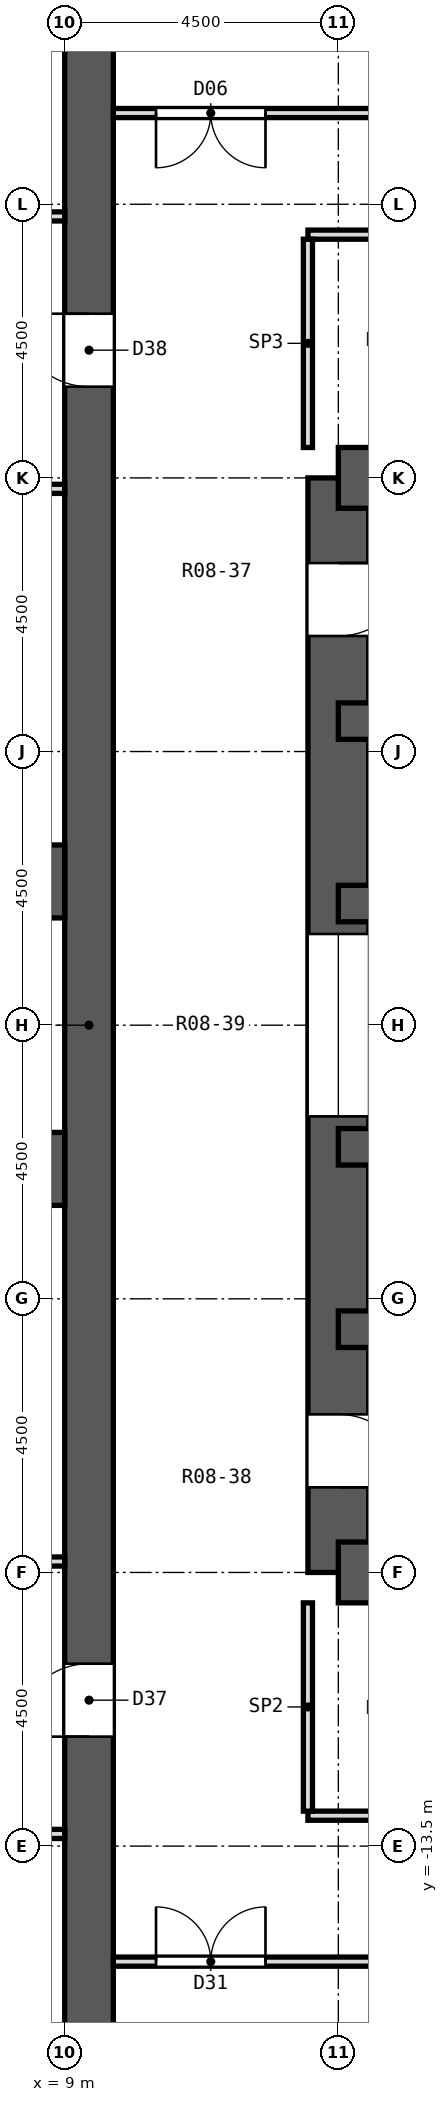
"""IFC4 building model, lengths in metres.
Left out: names, types, materials, properties, quantities, classifications, styles, units other than length and angle.
Written with IfcOpenShell. Run it as: python <this file> out.ifc"""

import sys

from ifc_helpers import new_model, si_unit, direction, frame, frame_2d, origin, place, context, subcontext, project, spatial, rectangle, extrude, element, fill, save


model = new_model("IFC4")
c1 = context("Model", 3, precision=1e-05, world=origin(), true_north=direction((0.0, 1.0)))
c2 = subcontext(c1, "Body", "Model", "MODEL_VIEW")
j1 = project(units=[si_unit("LENGTHUNIT", "METRE"), si_unit("PLANEANGLEUNIT", "RADIAN")], contexts=[c1])
p1 = place(None, origin())
s1 = spatial("IfcSite", under=j1, at=p1, CompositionType="ELEMENT")
p2 = place(p1, origin())
s2 = spatial("IfcBuilding", under=s1, at=p2, CompositionType="ELEMENT")
p3 = place(p2, frame((0.0, 0.0, 21.8)))
s3 = spatial("IfcBuildingStorey", under=s2, at=p3, CompositionType="ELEMENT", Elevation=21.8)
p4 = place(p3, frame((13.5, -9.0, 0.0), z_axis=(0.0, 0.0, 1.0), x_axis=(0.0, 1.0, 0.0)))
e1 = element("IfcWall", 1, at=p4, inside=s3, PredefinedType="SHEAR", context=c2, shape_type="SweptSolid", body=[
    extrude(rectangle(XDim=18.0, YDim=1.0, at=frame_2d((9.0, 0.0))), origin(), (0.0, 0.0, 1.0), 4.5),
])
p5 = place(p4, frame((15.4, 0.0, 0.0)))
e2 = element("IfcOpeningElement", 2, at=p5, cuts=e1, PredefinedType="OPENING", context=c2, shape_type="SweptSolid", body=[
    extrude(rectangle(XDim=1.2, YDim=2.1, at=frame_2d((0.6, 1.05))), frame((0.0, 0.512, 0.0), z_axis=(0.0, -1.0, 0.0), x_axis=(1.0, 0.0, 0.0)), (0.0, 0.0, 1.0), 1.024),
])
p6 = place(p4, frame((1.4, 0.0, 0.0)))
e3 = element("IfcOpeningElement", 3, at=p6, cuts=e1, PredefinedType="OPENING", context=c2, shape_type="SweptSolid", body=[
    extrude(rectangle(XDim=1.2, YDim=2.1, at=frame_2d((0.6, 1.05))), frame((0.0, 0.512, 0.0), z_axis=(0.0, -1.0, 0.0), x_axis=(1.0, 0.0, 0.0)), (0.0, 0.0, 1.0), 1.024),
])
p7 = place(p4, frame((7.5, 0.0, 0.0)))
e4 = element("IfcOpeningElement", 4, at=p7, cuts=e1, PredefinedType="OPENING", context=c2, shape_type="SweptSolid", body=[
    extrude(rectangle(XDim=3.0, YDim=2.4, at=frame_2d((1.5, 1.2))), frame((0.0, 0.512, 0.0), z_axis=(0.0, -1.0, 0.0), x_axis=(1.0, 0.0, 0.0)), (0.0, 0.0, 1.0), 1.024),
])
for number, where, z_axis, x_axis in (
    (5, (13.5, 9.0, 0.0), (0.0, 0.0, 1.0), (1.0, 0.0, 0.0)),
    (6, (13.5, -9.0, 0.0), (0.0, 0.0, 1.0), (1.0, 0.0, 0.0)),
):
    element("IfcWall", number, at=place(p3, frame(where, z_axis=z_axis, x_axis=x_axis)), inside=s3, PredefinedType="SHEAR", context=c2, shape_type="SweptSolid", body=[
        extrude(rectangle(XDim=12.4, YDim=1.0, at=frame_2d((6.2, 0.0))), origin(), (0.0, 0.0, 1.0), 4.5),
    ])
p8 = place(p3, frame((13.5, 5.0, 0.0), z_axis=(0.0, 0.0, 1.0), x_axis=(1.0, 0.0, 0.0)))
e7 = element("IfcWall", 7, at=p8, inside=s3, PredefinedType="SHEAR", context=c2, shape_type="SweptSolid", body=[
    extrude(rectangle(XDim=12.4, YDim=0.6, at=frame_2d((6.2, 0.0))), origin(), (0.0, 0.0, 1.0), 4.5),
])
p9 = place(p8, frame((10.35, 0.0, 0.0)))
e8 = element("IfcOpeningElement", 8, at=p9, cuts=e7, PredefinedType="OPENING", context=c2, shape_type="SweptSolid", body=[
    extrude(rectangle(XDim=0.9, YDim=2.1, at=frame_2d((0.45, 1.05))), frame((0.0, 0.312, 0.0), z_axis=(0.0, -1.0, 0.0), x_axis=(1.0, 0.0, 0.0)), (0.0, 0.0, 1.0), 0.624),
])
p10 = place(p3, frame((13.5, -5.0, 0.0), z_axis=(0.0, 0.0, 1.0), x_axis=(1.0, 0.0, 0.0)))
e9 = element("IfcWall", 9, at=p10, inside=s3, PredefinedType="SHEAR", context=c2, shape_type="SweptSolid", body=[
    extrude(rectangle(XDim=12.4, YDim=0.6, at=frame_2d((6.2, 0.0))), origin(), (0.0, 0.0, 1.0), 4.5),
])
p11 = place(p10, frame((10.31, 0.0, 0.0)))
e10 = element("IfcOpeningElement", 10, at=p11, cuts=e9, PredefinedType="OPENING", context=c2, shape_type="SweptSolid", body=[
    extrude(rectangle(XDim=0.9, YDim=2.1, at=frame_2d((0.45, 1.05))), frame((0.0, 0.312, 0.0), z_axis=(0.0, -1.0, 0.0), x_axis=(1.0, 0.0, 0.0)), (0.0, 0.0, 1.0), 0.624),
])
p12 = place(p10, frame((0.6, 0.0, 0.0)))
e11 = element("IfcOpeningElement", 11, at=p12, cuts=e9, PredefinedType="OPENING", context=c2, shape_type="SweptSolid", body=[
    extrude(rectangle(XDim=1.1, YDim=2.1, at=frame_2d((0.55, 1.05))), frame((0.0, 0.312, 0.0), z_axis=(0.0, -1.0, 0.0), x_axis=(1.0, 0.0, 0.0)), (0.0, 0.0, 1.0), 0.624),
])
p13 = place(p3, frame((13.5, 2.0, 0.0), z_axis=(0.0, 0.0, 1.0), x_axis=(1.0, 0.0, 0.0)))
e12 = element("IfcWall", 12, at=p13, inside=s3, PredefinedType="SHEAR", context=c2, shape_type="SweptSolid", body=[
    extrude(rectangle(XDim=12.4, YDim=0.6, at=frame_2d((6.2, 0.0))), origin(), (0.0, 0.0, 1.0), 4.5),
])
p14 = place(p13, frame((7.65, 0.0, 0.0)))
e13 = element("IfcOpeningElement", 13, at=p14, cuts=e12, PredefinedType="OPENING", context=c2, shape_type="SweptSolid", body=[
    extrude(rectangle(XDim=1.1, YDim=2.1, at=frame_2d((0.55, 1.05))), frame((0.0, 0.312, 0.0), z_axis=(0.0, -1.0, 0.0), x_axis=(1.0, 0.0, 0.0)), (0.0, 0.0, 1.0), 0.624),
])
p15 = place(p13, frame((1.076, 0.0, 0.0)))
e14 = element("IfcOpeningElement", 14, at=p15, cuts=e12, PredefinedType="OPENING", context=c2, shape_type="SweptSolid", body=[
    extrude(rectangle(XDim=0.9, YDim=2.1, at=frame_2d((0.45, 1.05))), frame((0.0, 0.312, 0.0), z_axis=(0.0, -1.0, 0.0), x_axis=(1.0, 0.0, 0.0)), (0.0, 0.0, 1.0), 0.624),
])
p16 = place(p13, frame((3.196, 0.0, 0.0)))
e15 = element("IfcOpeningElement", 15, at=p16, cuts=e12, PredefinedType="OPENING", context=c2, shape_type="SweptSolid", body=[
    extrude(rectangle(XDim=0.9, YDim=2.1, at=frame_2d((0.45, 1.05))), frame((0.0, 0.312, 0.0), z_axis=(0.0, -1.0, 0.0), x_axis=(1.0, 0.0, 0.0)), (0.0, 0.0, 1.0), 0.624),
])
p17 = place(p13, frame((5.59, 0.0, 0.0)))
e16 = element("IfcOpeningElement", 16, at=p17, cuts=e12, PredefinedType="OPENING", context=c2, shape_type="SweptSolid", body=[
    extrude(rectangle(XDim=0.9, YDim=2.1, at=frame_2d((0.45, 1.05))), frame((0.0, 0.312, 0.0), z_axis=(0.0, -1.0, 0.0), x_axis=(1.0, 0.0, 0.0)), (0.0, 0.0, 1.0), 0.624),
])
p18 = place(p13, frame((10.31, 0.0, 0.0)))
e17 = element("IfcOpeningElement", 17, at=p18, cuts=e12, PredefinedType="OPENING", context=c2, shape_type="SweptSolid", body=[
    extrude(rectangle(XDim=0.9, YDim=2.1, at=frame_2d((0.45, 1.05))), frame((0.0, 0.312, 0.0), z_axis=(0.0, -1.0, 0.0), x_axis=(1.0, 0.0, 0.0)), (0.0, 0.0, 1.0), 0.624),
])
p19 = place(p3, frame((13.5, -2.0, 0.0), z_axis=(0.0, 0.0, 1.0), x_axis=(1.0, 0.0, 0.0)))
e18 = element("IfcWall", 18, at=p19, inside=s3, PredefinedType="SHEAR", context=c2, shape_type="SweptSolid", body=[
    extrude(rectangle(XDim=12.4, YDim=0.6, at=frame_2d((6.2, 0.0))), origin(), (0.0, 0.0, 1.0), 4.5),
])
p20 = place(p19, frame((5.62, 0.0, 0.0)))
e19 = element("IfcOpeningElement", 19, at=p20, cuts=e18, PredefinedType="OPENING", context=c2, shape_type="SweptSolid", body=[
    extrude(rectangle(XDim=1.1, YDim=2.1, at=frame_2d((0.55, 1.05))), frame((0.0, 0.312, 0.0), z_axis=(0.0, -1.0, 0.0), x_axis=(1.0, 0.0, 0.0)), (0.0, 0.0, 1.0), 0.624),
])
p21 = place(p19, frame((7.65, 0.0, 0.0)))
e20 = element("IfcOpeningElement", 20, at=p21, cuts=e18, PredefinedType="OPENING", context=c2, shape_type="SweptSolid", body=[
    extrude(rectangle(XDim=1.1, YDim=2.1, at=frame_2d((0.55, 1.05))), frame((0.0, 0.312, 0.0), z_axis=(0.0, -1.0, 0.0), x_axis=(1.0, 0.0, 0.0)), (0.0, 0.0, 1.0), 0.624),
])
p22 = place(p19, frame((1.265, 0.0, 0.0)))
e21 = element("IfcOpeningElement", 21, at=p22, cuts=e18, PredefinedType="OPENING", context=c2, shape_type="SweptSolid", body=[
    extrude(rectangle(XDim=1.0, YDim=2.1, at=frame_2d((0.5, 1.05))), frame((0.0, 0.312, 0.0), z_axis=(0.0, -1.0, 0.0), x_axis=(1.0, 0.0, 0.0)), (0.0, 0.0, 1.0), 0.624),
])
p23 = place(p19, frame((10.31, 0.0, 0.0)))
e22 = element("IfcOpeningElement", 22, at=p23, cuts=e18, PredefinedType="OPENING", context=c2, shape_type="SweptSolid", body=[
    extrude(rectangle(XDim=0.9, YDim=2.1, at=frame_2d((0.45, 1.05))), frame((0.0, 0.312, 0.0), z_axis=(0.0, -1.0, 0.0), x_axis=(1.0, 0.0, 0.0)), (0.0, 0.0, 1.0), 0.624),
])
p24 = place(p3, frame((9.4, -27.077, 0.0), z_axis=(0.0, 0.0, 1.0), x_axis=(0.0, 1.0, 0.0)))
e23 = element("IfcWall", 23, at=p24, inside=s3, PredefinedType="SHEAR", context=c2, shape_type="SweptSolid", body=[
    extrude(rectangle(XDim=54.154, YDim=0.8, at=frame_2d((27.077, 0.0))), origin(), (0.0, 0.0, 1.0), 4.5),
])
p25 = place(p24, frame((15.377, 0.0, 0.0)))
e24 = element("IfcOpeningElement", 24, at=p25, cuts=e23, PredefinedType="OPENING", context=c2, shape_type="SweptSolid", body=[
    extrude(rectangle(XDim=1.2, YDim=2.1, at=frame_2d((0.6, 1.05))), frame((0.0, 0.412, 0.0), z_axis=(0.0, -1.0, 0.0), x_axis=(1.0, 0.0, 0.0)), (0.0, 0.0, 1.0), 0.824),
])
p26 = place(p24, frame((37.577, 0.0, 0.0)))
e25 = element("IfcOpeningElement", 25, at=p26, cuts=e23, PredefinedType="OPENING", context=c2, shape_type="SweptSolid", body=[
    extrude(rectangle(XDim=1.2, YDim=2.1, at=frame_2d((0.6, 1.05))), frame((0.0, 0.412, 0.0), z_axis=(0.0, -1.0, 0.0), x_axis=(1.0, 0.0, 0.0)), (0.0, 0.0, 1.0), 0.824),
])
for number, where, z_axis, x_axis in (
    (26, (8.68, 1.764, 0.0), (0.0, 0.0, 1.0), (0.0, 1.0, 0.0)),
    (27, (8.68, -2.964, 0.0), (0.0, 0.0, 1.0), (0.0, 1.0, 0.0)),
):
    element("IfcWall", number, at=place(p3, frame(where, z_axis=z_axis, x_axis=x_axis)), inside=s3, PredefinedType="SHEAR", context=c2, shape_type="SweptSolid", body=[
        extrude(rectangle(XDim=1.2, YDim=0.64, at=frame_2d((0.6, 0.0))), origin(), (0.0, 0.0, 1.0), 3.95),
    ])
p27 = place(p3, frame((9.8, -15.4, 0.0), z_axis=(0.0, 0.0, 1.0), x_axis=(1.0, 0.0, 0.0)))
e28 = element("IfcWall", 28, at=p27, inside=s3, PredefinedType="PARTITIONING", context=c2, shape_type="SweptSolid", body=[
    extrude(rectangle(XDim=13.975, YDim=0.15, at=frame_2d((6.987, 0.0))), origin(), (0.0, 0.0, 1.0), 3.95),
])
p28 = place(p27, frame((0.702, 0.0, 0.0)))
e29 = element("IfcOpeningElement", 29, at=p28, cuts=e28, PredefinedType="OPENING", context=c2, shape_type="SweptSolid", body=[
    extrude(rectangle(XDim=1.8, YDim=2.1, at=frame_2d((0.9, 1.05))), frame((0.0, 0.087, 0.0), z_axis=(0.0, -1.0, 0.0), x_axis=(1.0, 0.0, 0.0)), (0.0, 0.0, 1.0), 0.174),
])
p29 = place(p27, frame((8.396, 0.0, 0.0)))
e30 = element("IfcOpeningElement", 30, at=p29, cuts=e28, PredefinedType="OPENING", context=c2, shape_type="SweptSolid", body=[
    extrude(rectangle(XDim=1.0, YDim=2.1, at=frame_2d((0.5, 1.05))), frame((0.0, 0.087, 0.0), z_axis=(0.0, -1.0, 0.0), x_axis=(1.0, 0.0, 0.0)), (0.0, 0.0, 1.0), 0.174),
])
p30 = place(p3, frame((2.1, -13.3, 0.0), z_axis=(0.0, 0.0, 1.0), x_axis=(1.0, 0.0, 0.0)))
e31 = element("IfcWall", 31, at=p30, inside=s3, PredefinedType="PARTITIONING", context=c2, shape_type="SweptSolid", body=[
    extrude(rectangle(XDim=6.9, YDim=0.15, at=frame_2d((3.45, 0.0))), origin(), (0.0, 0.0, 1.0), 3.95),
])
p31 = place(p3, frame((13.0, -13.0, 0.0), z_axis=(0.0, 0.0, 1.0), x_axis=(1.0, 0.0, 0.0)))
e32 = element("IfcWall", 32, at=p31, inside=s3, PredefinedType="PARTITIONING", context=c2, shape_type="SweptSolid", body=[
    extrude(rectangle(XDim=12.16, YDim=0.15, at=frame_2d((6.08, 0.0))), origin(), (0.0, 0.0, 1.0), 3.95),
])
p32 = place(p31, frame((1.075, 0.0, 0.0)))
e33 = element("IfcOpeningElement", 33, at=p32, cuts=e32, PredefinedType="OPENING", context=c2, shape_type="SweptSolid", body=[
    extrude(rectangle(XDim=0.9, YDim=2.1, at=frame_2d((0.45, 1.05))), frame((0.0, 0.087, 0.0), z_axis=(0.0, -1.0, 0.0), x_axis=(1.0, 0.0, 0.0)), (0.0, 0.0, 1.0), 0.174),
])
p33 = place(p31, frame((4.125, 0.0, 0.0)))
e34 = element("IfcOpeningElement", 34, at=p33, cuts=e32, PredefinedType="OPENING", context=c2, shape_type="SweptSolid", body=[
    extrude(rectangle(XDim=0.9, YDim=2.1, at=frame_2d((0.45, 1.05))), frame((0.0, 0.087, 0.0), z_axis=(0.0, -1.0, 0.0), x_axis=(1.0, 0.0, 0.0)), (0.0, 0.0, 1.0), 0.174),
])
p34 = place(p31, frame((7.175, 0.0, 0.0)))
e35 = element("IfcOpeningElement", 35, at=p34, cuts=e32, PredefinedType="OPENING", context=c2, shape_type="SweptSolid", body=[
    extrude(rectangle(XDim=0.9, YDim=2.1, at=frame_2d((0.45, 1.05))), frame((0.0, 0.087, 0.0), z_axis=(0.0, -1.0, 0.0), x_axis=(1.0, 0.0, 0.0)), (0.0, 0.0, 1.0), 0.174),
])
p35 = place(p31, frame((10.205, 0.0, 0.0)))
e36 = element("IfcOpeningElement", 36, at=p35, cuts=e32, PredefinedType="OPENING", context=c2, shape_type="SweptSolid", body=[
    extrude(rectangle(XDim=0.9, YDim=2.1, at=frame_2d((0.45, 1.05))), frame((0.0, 0.087, 0.0), z_axis=(0.0, -1.0, 0.0), x_axis=(1.0, 0.0, 0.0)), (0.0, 0.0, 1.0), 0.174),
])
for number, where, z_axis, x_axis in (
    (37, (-9.0, -8.82, 0.0), (0.0, 0.0, 1.0), (1.0, 0.0, 0.0)),
    (38, (-9.0, 8.82, 0.0), (0.0, 0.0, 1.0), (1.0, 0.0, 0.0)),
):
    element("IfcWall", number, at=place(p3, frame(where, z_axis=z_axis, x_axis=x_axis)), inside=s3, PredefinedType="PARTITIONING", context=c2, shape_type="SweptSolid", body=[
        extrude(rectangle(XDim=18.0, YDim=0.15, at=frame_2d((9.0, 0.0))), origin(), (0.0, 0.0, 1.0), 3.95),
    ])
p36 = place(p3, frame((13.0, 13.0, 0.0), z_axis=(0.0, 0.0, 1.0), x_axis=(1.0, 0.0, 0.0)))
e39 = element("IfcWall", 39, at=p36, inside=s3, PredefinedType="PARTITIONING", context=c2, shape_type="SweptSolid", body=[
    extrude(rectangle(XDim=12.16, YDim=0.15, at=frame_2d((6.08, 0.0))), origin(), (0.0, 0.0, 1.0), 3.95),
])
p37 = place(p36, frame((10.205, 0.0, 0.0)))
e40 = element("IfcOpeningElement", 40, at=p37, cuts=e39, PredefinedType="OPENING", context=c2, shape_type="SweptSolid", body=[
    extrude(rectangle(XDim=0.9, YDim=2.1, at=frame_2d((0.45, 1.05))), frame((0.0, 0.087, 0.0), z_axis=(0.0, -1.0, 0.0), x_axis=(1.0, 0.0, 0.0)), (0.0, 0.0, 1.0), 0.174),
])
p38 = place(p36, frame((7.175, 0.0, 0.0)))
e41 = element("IfcOpeningElement", 41, at=p38, cuts=e39, PredefinedType="OPENING", context=c2, shape_type="SweptSolid", body=[
    extrude(rectangle(XDim=0.9, YDim=2.1, at=frame_2d((0.45, 1.05))), frame((0.0, 0.087, 0.0), z_axis=(0.0, -1.0, 0.0), x_axis=(1.0, 0.0, 0.0)), (0.0, 0.0, 1.0), 0.174),
])
p39 = place(p36, frame((4.125, 0.0, 0.0)))
e42 = element("IfcOpeningElement", 42, at=p39, cuts=e39, PredefinedType="OPENING", context=c2, shape_type="SweptSolid", body=[
    extrude(rectangle(XDim=0.9, YDim=2.1, at=frame_2d((0.45, 1.05))), frame((0.0, 0.087, 0.0), z_axis=(0.0, -1.0, 0.0), x_axis=(1.0, 0.0, 0.0)), (0.0, 0.0, 1.0), 0.174),
])
p40 = place(p36, frame((1.075, 0.0, 0.0)))
e43 = element("IfcOpeningElement", 43, at=p40, cuts=e39, PredefinedType="OPENING", context=c2, shape_type="SweptSolid", body=[
    extrude(rectangle(XDim=0.9, YDim=2.1, at=frame_2d((0.45, 1.05))), frame((0.0, 0.087, 0.0), z_axis=(0.0, -1.0, 0.0), x_axis=(1.0, 0.0, 0.0)), (0.0, 0.0, 1.0), 0.174),
])
p41 = place(p3, frame((2.1, 13.3, 0.0), z_axis=(0.0, 0.0, 1.0), x_axis=(1.0, 0.0, 0.0)))
e44 = element("IfcWall", 44, at=p41, inside=s3, PredefinedType="PARTITIONING", context=c2, shape_type="SweptSolid", body=[
    extrude(rectangle(XDim=6.9, YDim=0.15, at=frame_2d((3.45, 0.0))), origin(), (0.0, 0.0, 1.0), 3.95),
])
p42 = place(p3, frame((9.8, 15.0, 0.0), z_axis=(0.0, 0.0, 1.0), x_axis=(1.0, 0.0, 0.0)))
e45 = element("IfcWall", 45, at=p42, inside=s3, PredefinedType="PARTITIONING", context=c2, shape_type="SweptSolid", body=[
    extrude(rectangle(XDim=14.206, YDim=0.15, at=frame_2d((7.103, 0.0))), origin(), (0.0, 0.0, 1.0), 3.95),
])
p43 = place(p42, frame((7.911, 0.0, 0.0)))
e46 = element("IfcOpeningElement", 46, at=p43, cuts=e45, PredefinedType="OPENING", context=c2, shape_type="SweptSolid", body=[
    extrude(rectangle(XDim=1.0, YDim=2.1, at=frame_2d((0.5, 1.05))), frame((0.0, 0.087, 0.0), z_axis=(0.0, -1.0, 0.0), x_axis=(1.0, 0.0, 0.0)), (0.0, 0.0, 1.0), 0.174),
])
p44 = place(p42, frame((0.702, 0.0, 0.0)))
e47 = element("IfcOpeningElement", 47, at=p44, cuts=e45, PredefinedType="OPENING", context=c2, shape_type="SweptSolid", body=[
    extrude(rectangle(XDim=1.8, YDim=2.1, at=frame_2d((0.9, 1.05))), frame((0.0, 0.087, 0.0), z_axis=(0.0, -1.0, 0.0), x_axis=(1.0, 0.0, 0.0)), (0.0, 0.0, 1.0), 0.174),
])
for number, where, z_axis, x_axis in (
    (48, (13.0, -12.925, 0.0), (0.0, 0.0, 1.0), (0.0, 1.0, 0.0)),
    (49, (13.0, 9.5, 0.0), (0.0, 0.0, 1.0), (0.0, 1.0, 0.0)),
):
    element("IfcWall", number, at=place(p3, frame(where, z_axis=z_axis, x_axis=x_axis)), inside=s3, PredefinedType="PARTITIONING", context=c2, shape_type="SweptSolid", body=[
        extrude(rectangle(XDim=3.425, YDim=0.15, at=frame_2d((1.712, 0.0))), origin(), (0.0, 0.0, 1.0), 3.95),
    ])
p45 = place(p44, frame((1.8, 0.0, 0.0), z_axis=(0.0, 0.0, 1.0), x_axis=(-1.0, 0.0, 0.0)))
e50 = element("IfcDoor", 50, at=p45, inside=s3, OperationType="DOUBLE_DOOR_SINGLE_SWING", PredefinedType="DOOR", context=c2, shape_type="SweptSolid", body=[
    extrude(rectangle(XDim=1.8, YDim=2.1, at=frame_2d((0.9, 1.05))), frame((0.0, 0.025, 0.0), z_axis=(0.0, -1.0, 0.0), x_axis=(1.0, 0.0, 0.0)), (0.0, 0.0, 1.0), 0.05),
])
fill(e47, e50)
p46 = place(p28, origin())
e51 = element("IfcDoor", 51, at=p46, inside=s3, OperationType="DOUBLE_DOOR_SINGLE_SWING", PredefinedType="DOOR", context=c2, shape_type="SweptSolid", body=[
    extrude(rectangle(XDim=1.8, YDim=2.1, at=frame_2d((0.9, 1.05))), frame((0.0, 0.025, 0.0), z_axis=(0.0, -1.0, 0.0), x_axis=(1.0, 0.0, 0.0)), (0.0, 0.0, 1.0), 0.05),
])
fill(e29, e51)
p47 = place(p25, origin())
e52 = element("IfcDoor", 52, at=p47, inside=s3, OperationType="SINGLE_SWING_LEFT", PredefinedType="DOOR", context=c2, shape_type="SweptSolid", body=[
    extrude(rectangle(XDim=1.2, YDim=2.1, at=frame_2d((0.6, 1.05))), frame((0.0, 0.025, 0.0), z_axis=(0.0, -1.0, 0.0), x_axis=(1.0, 0.0, 0.0)), (0.0, 0.0, 1.0), 0.05),
])
fill(e24, e52)
p48 = place(p26, origin())
e53 = element("IfcDoor", 53, at=p48, inside=s3, OperationType="SINGLE_SWING_RIGHT", PredefinedType="DOOR", context=c2, shape_type="SweptSolid", body=[
    extrude(rectangle(XDim=1.2, YDim=2.1, at=frame_2d((0.6, 1.05))), frame((0.0, 0.025, 0.0), z_axis=(0.0, -1.0, 0.0), x_axis=(1.0, 0.0, 0.0)), (0.0, 0.0, 1.0), 0.05),
])
fill(e25, e53)
p49 = place(p5, frame((1.2, 0.0, 0.0), z_axis=(0.0, 0.0, 1.0), x_axis=(-1.0, 0.0, 0.0)))
e54 = element("IfcDoor", 54, at=p49, inside=s3, OperationType="SINGLE_SWING_LEFT", PredefinedType="DOOR", context=c2, shape_type="SweptSolid", body=[
    extrude(rectangle(XDim=1.2, YDim=2.1, at=frame_2d((0.6, 1.05))), frame((0.0, 0.025, 0.0), z_axis=(0.0, -1.0, 0.0), x_axis=(1.0, 0.0, 0.0)), (0.0, 0.0, 1.0), 0.05),
])
fill(e2, e54)
p50 = place(p6, frame((1.2, 0.0, 0.0), z_axis=(0.0, 0.0, 1.0), x_axis=(-1.0, 0.0, 0.0)))
e55 = element("IfcDoor", 55, at=p50, inside=s3, OperationType="SINGLE_SWING_RIGHT", PredefinedType="DOOR", context=c2, shape_type="SweptSolid", body=[
    extrude(rectangle(XDim=1.2, YDim=2.1, at=frame_2d((0.6, 1.05))), frame((0.0, 0.025, 0.0), z_axis=(0.0, -1.0, 0.0), x_axis=(1.0, 0.0, 0.0)), (0.0, 0.0, 1.0), 0.05),
])
fill(e3, e55)
p51 = place(p7, origin())
e56 = element("IfcDoor", 56, at=p51, inside=s3, OperationType="DOUBLE_DOOR_SLIDING", PredefinedType="DOOR", context=c2, shape_type="SweptSolid", body=[
    extrude(rectangle(XDim=3.0, YDim=2.4, at=frame_2d((1.5, 1.2))), frame((0.0, 0.025, 0.0), z_axis=(0.0, -1.0, 0.0), x_axis=(1.0, 0.0, 0.0)), (0.0, 0.0, 1.0), 0.05),
])
fill(e4, e56)
save(model, sys.argv[1])
